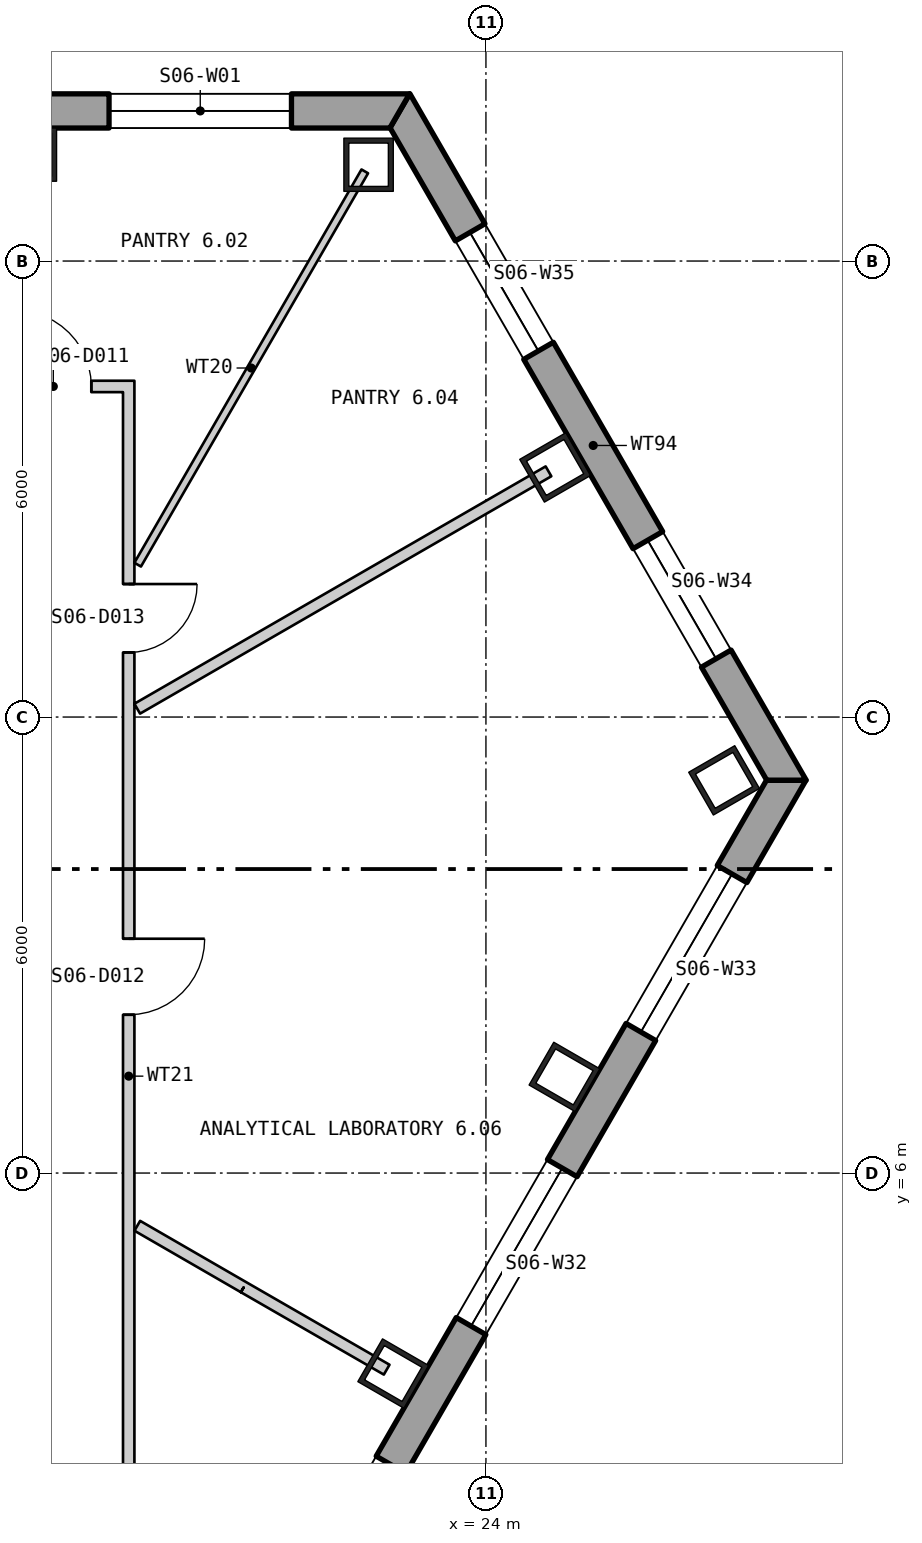
"""IFC4 building model, lengths in metres.
Left out: names, types, materials, properties, quantities, classifications, styles, units other than length and angle.
Written with IfcOpenShell. Run it as: python <this file> out.ifc"""

import sys

from ifc_helpers import new_model, si_unit, direction, frame, frame_2d, origin, origin_2d, place, context, subcontext, project, spatial, polyline, rectangle, hollow_rectangle, outline, extrude, element, fill, save


model = new_model("IFC4")
c1 = context("Model", 3, precision=1e-05, world=origin(), true_north=direction((0.0, 1.0)))
c2 = subcontext(c1, "Body", "Model", "MODEL_VIEW")
j1 = project(units=[si_unit("LENGTHUNIT", "METRE"), si_unit("PLANEANGLEUNIT", "RADIAN")], contexts=[c1])
p1 = place(None, origin())
s1 = spatial("IfcSite", under=j1, at=p1, CompositionType="ELEMENT")
p2 = place(p1, origin())
s2 = spatial("IfcBuilding", under=s1, at=p2, CompositionType="ELEMENT")
p3 = place(p2, frame((0.0, 0.0, 84.3)))
s3 = spatial("IfcBuildingStorey", under=s2, at=p3, CompositionType="ELEMENT", Elevation=84.3)
for number, where, z_axis, x_axis in (
    (1, (22.456, 19.267, 0.0), (0.0, 0.0, 1.0), (-1.0, 0.0, 0.0)),
    (2, (18.026, 19.4, 0.0), (0.0, 0.0, 1.0), (-1.0, 0.0, 0.0)),
    (3, (22.78, 3.362, 0.0), (0.0, 0.0, 1.0), (0.5, 0.866, 0.0)),
    (4, (25.033, 7.265, 0.0), (0.0, 0.0, 1.0), (0.5, 0.866, 0.0)),
    (5, (27.133, 11.167, 0.0), (0.0, 0.0, 1.0), (-0.5, 0.866, 0.0)),
):
    element("IfcColumn", number, at=place(p3, frame(where, z_axis=z_axis, x_axis=x_axis)), inside=s3, PredefinedType="COLUMN", context=c2, shape_type="SweptSolid", body=[
        extrude(hollow_rectangle(XDim=0.65, YDim=0.7, WallThickness=0.065, at=origin_2d()), origin(), (0.0, 0.0, 1.0), 4.5),
    ])
p4 = place(p3, frame((24.91, 15.284, -0.8), z_axis=(0.0, 0.0, 1.0), x_axis=(-0.5, 0.866025403784, 0.0)))
e6 = element("IfcColumn", 6, at=p4, inside=s3, PredefinedType="COLUMN", context=c2, shape_type="SweptSolid", body=[
    extrude(hollow_rectangle(XDim=0.65, YDim=0.7, WallThickness=0.065, at=origin_2d()), origin(), (0.0, 0.0, 1.0), 5.3),
])
p5 = place(p3, frame((22.865, 19.975, -0.4), z_axis=(0.0, 0.0, 1.0), x_axis=(-1.0, 0.0, 0.0)))
e7 = element("IfcWall", 7, at=p5, inside=s3, PredefinedType="SOLIDWALL", context=c2, shape_type="SweptSolid", body=[
    extrude(outline(polyline([(-0.13, -0.225), (45.86, -0.225), (45.6, 0.225), (0.13, 0.225), (-0.13, -0.225)])), origin(), (0.0, 0.0, 1.0), 4.5),
])
p6 = place(p5, frame((1.424, 0.0, 1.3)))
e8 = element("IfcOpeningElement", 8, at=p6, cuts=e7, PredefinedType="OPENING", context=c2, shape_type="SweptSolid", body=[
    extrude(rectangle(XDim=2.4, YDim=2.6, at=frame_2d((1.2, 1.3))), frame((0.0, 0.235, 0.0), z_axis=(0.0, -1.0, 0.0), x_axis=(1.0, 0.0, 0.0)), (0.0, 0.0, 1.0), 0.47),
])
p7 = place(p5, frame((5.892, 0.0, 1.3)))
e9 = element("IfcOpeningElement", 9, at=p7, cuts=e7, PredefinedType="OPENING", context=c2, shape_type="SweptSolid", body=[
    extrude(rectangle(XDim=2.4, YDim=2.6, at=frame_2d((1.2, 1.3))), frame((0.0, 0.235, 0.0), z_axis=(0.0, -1.0, 0.0), x_axis=(1.0, 0.0, 0.0)), (0.0, 0.0, 1.0), 0.47),
])
p8 = place(p5, frame((10.399, 0.0, 1.3)))
e10 = element("IfcOpeningElement", 10, at=p8, cuts=e7, PredefinedType="OPENING", context=c2, shape_type="SweptSolid", body=[
    extrude(rectangle(XDim=2.4, YDim=2.6, at=frame_2d((1.2, 1.3))), frame((0.0, 0.235, 0.0), z_axis=(0.0, -1.0, 0.0), x_axis=(1.0, 0.0, 0.0)), (0.0, 0.0, 1.0), 0.47),
])
p9 = place(p5, frame((14.905, 0.0, 1.3)))
e11 = element("IfcOpeningElement", 11, at=p9, cuts=e7, PredefinedType="OPENING", context=c2, shape_type="SweptSolid", body=[
    extrude(rectangle(XDim=2.4, YDim=2.6, at=frame_2d((1.2, 1.3))), frame((0.0, 0.235, 0.0), z_axis=(0.0, -1.0, 0.0), x_axis=(1.0, 0.0, 0.0)), (0.0, 0.0, 1.0), 0.47),
])
p10 = place(p5, frame((19.412, 0.0, 1.3)))
e12 = element("IfcOpeningElement", 12, at=p10, cuts=e7, PredefinedType="OPENING", context=c2, shape_type="SweptSolid", body=[
    extrude(rectangle(XDim=2.4, YDim=2.6, at=frame_2d((1.2, 1.3))), frame((0.0, 0.235, 0.0), z_axis=(0.0, -1.0, 0.0), x_axis=(1.0, 0.0, 0.0)), (0.0, 0.0, 1.0), 0.47),
])
p11 = place(p5, frame((23.918, 0.0, 1.3)))
e13 = element("IfcOpeningElement", 13, at=p11, cuts=e7, PredefinedType="OPENING", context=c2, shape_type="SweptSolid", body=[
    extrude(rectangle(XDim=2.4, YDim=2.6, at=frame_2d((1.2, 1.3))), frame((0.0, 0.235, 0.0), z_axis=(0.0, -1.0, 0.0), x_axis=(1.0, 0.0, 0.0)), (0.0, 0.0, 1.0), 0.47),
])
p12 = place(p5, frame((28.425, 0.0, 1.3)))
e14 = element("IfcOpeningElement", 14, at=p12, cuts=e7, PredefinedType="OPENING", context=c2, shape_type="SweptSolid", body=[
    extrude(rectangle(XDim=2.4, YDim=2.6, at=frame_2d((1.2, 1.3))), frame((0.0, 0.235, 0.0), z_axis=(0.0, -1.0, 0.0), x_axis=(1.0, 0.0, 0.0)), (0.0, 0.0, 1.0), 0.47),
])
p13 = place(p5, frame((32.932, 0.0, 1.3)))
e15 = element("IfcOpeningElement", 15, at=p13, cuts=e7, PredefinedType="OPENING", context=c2, shape_type="SweptSolid", body=[
    extrude(rectangle(XDim=2.4, YDim=2.6, at=frame_2d((1.2, 1.3))), frame((0.0, 0.235, 0.0), z_axis=(0.0, -1.0, 0.0), x_axis=(1.0, 0.0, 0.0)), (0.0, 0.0, 1.0), 0.47),
])
p14 = place(p5, frame((37.438, 0.0, 1.3)))
e16 = element("IfcOpeningElement", 16, at=p14, cuts=e7, PredefinedType="OPENING", context=c2, shape_type="SweptSolid", body=[
    extrude(rectangle(XDim=2.4, YDim=2.6, at=frame_2d((1.2, 1.3))), frame((0.0, 0.235, 0.0), z_axis=(0.0, -1.0, 0.0), x_axis=(1.0, 0.0, 0.0)), (0.0, 0.0, 1.0), 0.47),
])
p15 = place(p5, frame((41.907, 0.0, 1.3)))
e17 = element("IfcOpeningElement", 17, at=p15, cuts=e7, PredefinedType="OPENING", context=c2, shape_type="SweptSolid", body=[
    extrude(rectangle(XDim=2.4, YDim=2.6, at=frame_2d((1.2, 1.3))), frame((0.0, 0.235, 0.0), z_axis=(0.0, -1.0, 0.0), x_axis=(1.0, 0.0, 0.0)), (0.0, 0.0, 1.0), 0.47),
])
p16 = place(p3, frame((5.085, -28.436, -0.18), z_axis=(0.0, 0.0, 1.0), x_axis=(0.499999194392, 0.866025868902, 0.0)))
e18 = element("IfcWall", 18, at=p16, inside=s3, PredefinedType="SOLIDWALL", context=c2, shape_type="SweptSolid", body=[
    extrude(outline(polyline([(-0.13, -0.225), (45.86, -0.225), (45.6, 0.225), (0.13, 0.225), (-0.13, -0.225)])), origin(), (0.0, 0.0, 1.0), 4.28),
])
p17 = place(p16, frame((1.424, 0.0, 1.08)))
e19 = element("IfcOpeningElement", 19, at=p17, cuts=e18, PredefinedType="OPENING", context=c2, shape_type="SweptSolid", body=[
    extrude(rectangle(XDim=2.4, YDim=2.6, at=frame_2d((1.2, 1.3))), frame((0.0, 0.235, 0.0), z_axis=(0.0, -1.0, 0.0), x_axis=(1.0, 0.0, 0.0)), (0.0, 0.0, 1.0), 0.47),
])
p18 = place(p16, frame((5.892, 0.0, 1.08)))
e20 = element("IfcOpeningElement", 20, at=p18, cuts=e18, PredefinedType="OPENING", context=c2, shape_type="SweptSolid", body=[
    extrude(rectangle(XDim=2.4, YDim=2.6, at=frame_2d((1.2, 1.3))), frame((0.0, 0.235, 0.0), z_axis=(0.0, -1.0, 0.0), x_axis=(1.0, 0.0, 0.0)), (0.0, 0.0, 1.0), 0.47),
])
p19 = place(p16, frame((10.399, 0.0, 1.08)))
e21 = element("IfcOpeningElement", 21, at=p19, cuts=e18, PredefinedType="OPENING", context=c2, shape_type="SweptSolid", body=[
    extrude(rectangle(XDim=2.4, YDim=2.6, at=frame_2d((1.2, 1.3))), frame((0.0, 0.235, 0.0), z_axis=(0.0, -1.0, 0.0), x_axis=(1.0, 0.0, 0.0)), (0.0, 0.0, 1.0), 0.47),
])
p20 = place(p16, frame((14.905, 0.0, 1.08)))
e22 = element("IfcOpeningElement", 22, at=p20, cuts=e18, PredefinedType="OPENING", context=c2, shape_type="SweptSolid", body=[
    extrude(rectangle(XDim=2.4, YDim=2.6, at=frame_2d((1.2, 1.3))), frame((0.0, 0.235, 0.0), z_axis=(0.0, -1.0, 0.0), x_axis=(1.0, 0.0, 0.0)), (0.0, 0.0, 1.0), 0.47),
])
p21 = place(p16, frame((19.412, 0.0, 1.08)))
e23 = element("IfcOpeningElement", 23, at=p21, cuts=e18, PredefinedType="OPENING", context=c2, shape_type="SweptSolid", body=[
    extrude(rectangle(XDim=2.4, YDim=2.6, at=frame_2d((1.2, 1.3))), frame((0.0, 0.235, 0.0), z_axis=(0.0, -1.0, 0.0), x_axis=(1.0, 0.0, 0.0)), (0.0, 0.0, 1.0), 0.47),
])
p22 = place(p16, frame((23.918, 0.0, 1.08)))
e24 = element("IfcOpeningElement", 24, at=p22, cuts=e18, PredefinedType="OPENING", context=c2, shape_type="SweptSolid", body=[
    extrude(rectangle(XDim=2.4, YDim=2.6, at=frame_2d((1.2, 1.3))), frame((0.0, 0.235, 0.0), z_axis=(0.0, -1.0, 0.0), x_axis=(1.0, 0.0, 0.0)), (0.0, 0.0, 1.0), 0.47),
])
p23 = place(p16, frame((28.425, 0.0, 1.08)))
e25 = element("IfcOpeningElement", 25, at=p23, cuts=e18, PredefinedType="OPENING", context=c2, shape_type="SweptSolid", body=[
    extrude(rectangle(XDim=2.4, YDim=2.6, at=frame_2d((1.2, 1.3))), frame((0.0, 0.235, 0.0), z_axis=(0.0, -1.0, 0.0), x_axis=(1.0, 0.0, 0.0)), (0.0, 0.0, 1.0), 0.47),
])
p24 = place(p16, frame((32.932, 0.0, 1.08)))
e26 = element("IfcOpeningElement", 26, at=p24, cuts=e18, PredefinedType="OPENING", context=c2, shape_type="SweptSolid", body=[
    extrude(rectangle(XDim=2.4, YDim=2.6, at=frame_2d((1.2, 1.3))), frame((0.0, 0.235, 0.0), z_axis=(0.0, -1.0, 0.0), x_axis=(1.0, 0.0, 0.0)), (0.0, 0.0, 1.0), 0.47),
])
p25 = place(p16, frame((37.438, 0.0, 1.08)))
e27 = element("IfcOpeningElement", 27, at=p25, cuts=e18, PredefinedType="OPENING", context=c2, shape_type="SweptSolid", body=[
    extrude(rectangle(XDim=2.4, YDim=2.6, at=frame_2d((1.2, 1.3))), frame((0.0, 0.235, 0.0), z_axis=(0.0, -1.0, 0.0), x_axis=(1.0, 0.0, 0.0)), (0.0, 0.0, 1.0), 0.47),
])
p26 = place(p16, frame((41.907, 0.0, 1.08)))
e28 = element("IfcOpeningElement", 28, at=p26, cuts=e18, PredefinedType="OPENING", context=c2, shape_type="SweptSolid", body=[
    extrude(rectangle(XDim=2.4, YDim=2.6, at=frame_2d((1.2, 1.3))), frame((0.0, 0.235, 0.0), z_axis=(0.0, -1.0, 0.0), x_axis=(1.0, 0.0, 0.0)), (0.0, 0.0, 1.0), 0.47),
])
p27 = place(p3, frame((27.954, 11.169, -0.4), z_axis=(0.0, 0.0, 1.0), x_axis=(-0.499997937663, 0.866026594472, 0.0)))
e29 = element("IfcWall", 29, at=p27, inside=s3, PredefinedType="SOLIDWALL", context=c2, shape_type="SweptSolid", body=[
    extrude(outline(polyline([(-0.13, -0.225), (10.3, -0.225), (10.04, 0.225), (0.13, 0.225), (-0.13, -0.225)])), origin(), (0.0, 0.0, 1.0), 4.5),
])
p28 = place(p27, frame((1.847, 0.0, 1.3)))
e30 = element("IfcOpeningElement", 30, at=p28, cuts=e29, PredefinedType="OPENING", context=c2, shape_type="SweptSolid", body=[
    extrude(rectangle(XDim=1.8, YDim=2.6, at=frame_2d((0.9, 1.3))), frame((0.0, 0.235, 0.0), z_axis=(0.0, -1.0, 0.0), x_axis=(1.0, 0.0, 0.0)), (0.0, 0.0, 1.0), 0.47),
])
p29 = place(p27, frame((6.523, 0.0, 1.3)))
e31 = element("IfcOpeningElement", 31, at=p29, cuts=e29, PredefinedType="OPENING", context=c2, shape_type="SweptSolid", body=[
    extrude(rectangle(XDim=1.8, YDim=2.6, at=frame_2d((0.9, 1.3))), frame((0.0, 0.235, 0.0), z_axis=(0.0, -1.0, 0.0), x_axis=(1.0, 0.0, 0.0)), (0.0, 0.0, 1.0), 0.47),
])
p30 = place(p3, frame((17.5, 16.35, 0.0), z_axis=(0.0, 0.0, 1.0), x_axis=(1.0, 0.0, 0.0)))
e32 = element("IfcWall", 32, at=p30, inside=s3, PredefinedType="PARTITIONING", context=c2, shape_type="SweptSolid", body=[
    extrude(rectangle(XDim=1.725, YDim=0.15, at=frame_2d((0.863, 0.0))), origin(), (0.0, 0.0, 1.0), 4.3),
])
p31 = place(p30, frame((0.308, 0.0, 0.0)))
e33 = element("IfcOpeningElement", 33, at=p31, cuts=e32, PredefinedType="OPENING", context=c2, shape_type="SweptSolid", body=[
    extrude(rectangle(XDim=1.0, YDim=2.1, at=frame_2d((0.5, 1.05))), frame((0.0, 0.085, 0.0), z_axis=(0.0, -1.0, 0.0), x_axis=(1.0, 0.0, 0.0)), (0.0, 0.0, 1.0), 0.17),
])
p32 = place(p3, frame((19.3, -1.875, 0.0), z_axis=(0.0, 0.0, 1.0), x_axis=(0.0, 1.0, 0.0)))
e34 = element("IfcWall", 34, at=p32, inside=s3, PredefinedType="PARTITIONING", context=c2, shape_type="SweptSolid", body=[
    extrude(rectangle(XDim=18.3, YDim=0.15, at=frame_2d((9.15, 0.0))), origin(), (0.0, 0.0, 1.0), 4.3),
])
p33 = place(p32, frame((9.958, 0.0, 0.0)))
e35 = element("IfcOpeningElement", 35, at=p33, cuts=e34, PredefinedType="OPENING", context=c2, shape_type="SweptSolid", body=[
    extrude(rectangle(XDim=1.0, YDim=2.1, at=frame_2d((0.5, 1.05))), frame((0.0, 0.085, 0.0), z_axis=(0.0, -1.0, 0.0), x_axis=(1.0, 0.0, 0.0)), (0.0, 0.0, 1.0), 0.17),
])
p34 = place(p32, frame((14.725, 0.0, 0.0)))
e36 = element("IfcOpeningElement", 36, at=p34, cuts=e34, PredefinedType="OPENING", context=c2, shape_type="SweptSolid", body=[
    extrude(rectangle(XDim=0.9, YDim=2.1, at=frame_2d((0.45, 1.05))), frame((0.0, 0.085, 0.0), z_axis=(0.0, -1.0, 0.0), x_axis=(1.0, 0.0, 0.0)), (0.0, 0.0, 1.0), 0.17),
])
p35 = place(p3, frame((19.412, 12.11, 0.0), z_axis=(0.0, 0.0, 1.0), x_axis=(0.866097636026, 0.499874869213, 0.0)))
e37 = element("IfcWall", 37, at=p35, inside=s3, PredefinedType="PARTITIONING", context=c2, shape_type="SweptSolid", body=[
    extrude(rectangle(XDim=6.248, YDim=0.15, at=frame_2d((3.124, 0.0))), origin(), (0.0, 0.0, 1.0), 4.3),
])
p36 = place(p3, frame((19.413, 5.306, 0.0), z_axis=(0.0, 0.0, 1.0), x_axis=(0.865835305332, -0.500329115724, 0.0)))
e38 = element("IfcWall", 38, at=p36, inside=s3, PredefinedType="PARTITIONING", context=c2, shape_type="SweptSolid", body=[
    extrude(rectangle(XDim=1.617, YDim=0.15, at=frame_2d((0.808, 0.0))), origin(), (0.0, 0.0, 1.0), 4.3),
])
p37 = place(p3, frame((19.418, 14.005, 0.0), z_axis=(0.0, 0.0, 1.0), x_axis=(0.500026652407, 0.866010015463, 0.0)))
e39 = element("IfcWall", 39, at=p37, inside=s3, PredefinedType="PARTITIONING", context=c2, shape_type="SweptSolid", body=[
    extrude(rectangle(XDim=5.976, YDim=0.1, at=frame_2d((2.988, 0.0))), origin(), (0.0, 0.0, 1.0), 4.3),
])
p38 = place(p3, frame((20.813, 4.497, 0.0), z_axis=(0.0, 0.0, 1.0), x_axis=(0.866423210078, -0.499310345414, 0.0)))
e40 = element("IfcWall", 40, at=p38, inside=s3, PredefinedType="PARTITIONING", context=c2, shape_type="SweptSolid", body=[
    extrude(rectangle(XDim=2.171, YDim=0.15, at=frame_2d((1.085, 0.0))), origin(), (0.0, 0.0, 1.0), 4.3),
])
p39 = place(p6, origin())
e41 = element("IfcWindow", 41, at=p39, inside=s3, PartitioningType="SINGLE_PANEL", PredefinedType="WINDOW", context=c2, shape_type="SweptSolid", body=[
    extrude(rectangle(XDim=2.4, YDim=2.6, at=frame_2d((1.2, 1.3))), frame((0.0, 0.105, 0.0), z_axis=(0.0, -1.0, 0.0), x_axis=(1.0, 0.0, 0.0)), (0.0, 0.0, 1.0), 0.06),
])
fill(e8, e41)
p40 = place(p24, origin())
e42 = element("IfcWindow", 42, at=p40, inside=s3, PartitioningType="SINGLE_PANEL", PredefinedType="WINDOW", context=c2, shape_type="SweptSolid", body=[
    extrude(rectangle(XDim=2.4, YDim=2.6, at=frame_2d((1.2, 1.3))), frame((0.0, 0.105, 0.0), z_axis=(0.0, -1.0, 0.0), x_axis=(1.0, 0.0, 0.0)), (0.0, 0.0, 1.0), 0.06),
])
fill(e26, e42)
p41 = place(p25, origin())
e43 = element("IfcWindow", 43, at=p41, inside=s3, PartitioningType="SINGLE_PANEL", PredefinedType="WINDOW", context=c2, shape_type="SweptSolid", body=[
    extrude(rectangle(XDim=2.4, YDim=2.6, at=frame_2d((1.2, 1.3))), frame((0.0, 0.105, 0.0), z_axis=(0.0, -1.0, 0.0), x_axis=(1.0, 0.0, 0.0)), (0.0, 0.0, 1.0), 0.06),
])
fill(e27, e43)
p42 = place(p26, origin())
e44 = element("IfcWindow", 44, at=p42, inside=s3, PartitioningType="SINGLE_PANEL", PredefinedType="WINDOW", context=c2, shape_type="SweptSolid", body=[
    extrude(rectangle(XDim=2.4, YDim=2.6, at=frame_2d((1.2, 1.3))), frame((0.0, 0.105, 0.0), z_axis=(0.0, -1.0, 0.0), x_axis=(1.0, 0.0, 0.0)), (0.0, 0.0, 1.0), 0.06),
])
fill(e28, e44)
p43 = place(p28, origin())
e45 = element("IfcWindow", 45, at=p43, inside=s3, PartitioningType="SINGLE_PANEL", PredefinedType="WINDOW", context=c2, shape_type="SweptSolid", body=[
    extrude(rectangle(XDim=1.8, YDim=2.6, at=frame_2d((0.9, 1.3))), frame((0.0, 0.105, 0.0), z_axis=(0.0, -1.0, 0.0), x_axis=(1.0, 0.0, 0.0)), (0.0, 0.0, 1.0), 0.06),
])
fill(e30, e45)
p44 = place(p29, origin())
e46 = element("IfcWindow", 46, at=p44, inside=s3, PartitioningType="SINGLE_PANEL", PredefinedType="WINDOW", context=c2, shape_type="SweptSolid", body=[
    extrude(rectangle(XDim=1.8, YDim=2.6, at=frame_2d((0.9, 1.3))), frame((0.0, 0.105, 0.0), z_axis=(0.0, -1.0, 0.0), x_axis=(1.0, 0.0, 0.0)), (0.0, 0.0, 1.0), 0.06),
])
fill(e31, e46)
p45 = place(p31, origin())
e47 = element("IfcDoor", 47, at=p45, inside=s3, OperationType="SINGLE_SWING_RIGHT", PredefinedType="DOOR", context=c2, shape_type="SweptSolid", body=[
    extrude(rectangle(XDim=1.0, YDim=2.1, at=frame_2d((0.5, 1.05))), frame((0.0, 0.025, 0.0), z_axis=(0.0, -1.0, 0.0), x_axis=(1.0, 0.0, 0.0)), (0.0, 0.0, 1.0), 0.05),
])
fill(e33, e47)
p46 = place(p33, origin())
e48 = element("IfcDoor", 48, at=p46, inside=s3, OperationType="SINGLE_SWING_RIGHT", PredefinedType="DOOR", context=c2, shape_type="SweptSolid", body=[
    extrude(rectangle(XDim=1.0, YDim=2.1, at=frame_2d((0.5, 1.05))), frame((0.0, 0.025, 0.0), z_axis=(0.0, -1.0, 0.0), x_axis=(1.0, 0.0, 0.0)), (0.0, 0.0, 1.0), 0.05),
])
fill(e35, e48)
p47 = place(p34, origin())
e49 = element("IfcDoor", 49, at=p47, inside=s3, OperationType="SINGLE_SWING_RIGHT", PredefinedType="DOOR", context=c2, shape_type="SweptSolid", body=[
    extrude(rectangle(XDim=0.9, YDim=2.1, at=frame_2d((0.45, 1.05))), frame((0.0, 0.025, 0.0), z_axis=(0.0, -1.0, 0.0), x_axis=(1.0, 0.0, 0.0)), (0.0, 0.0, 1.0), 0.05),
])
fill(e36, e49)
save(model, sys.argv[1])
